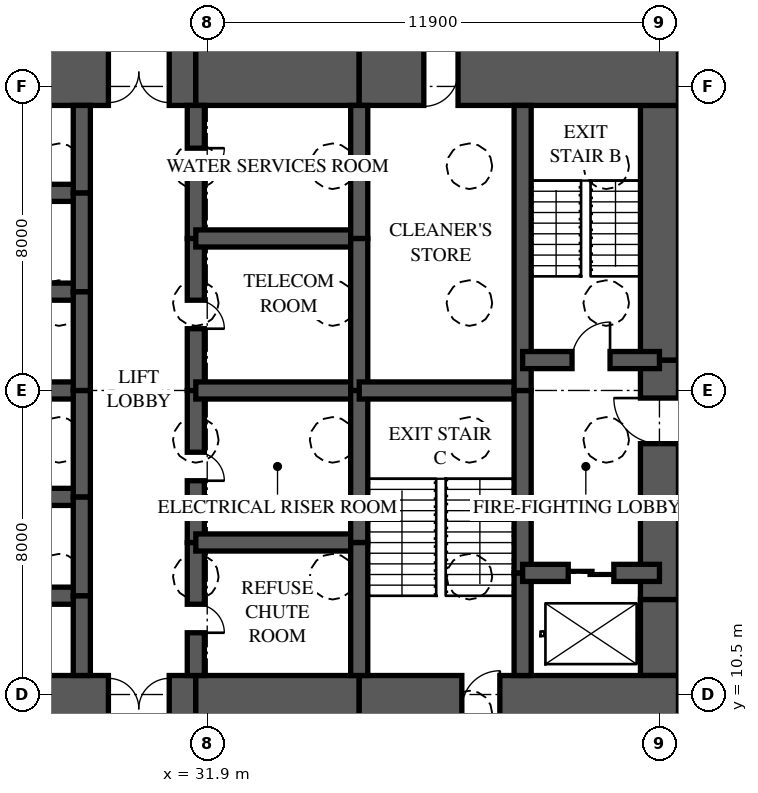
"""IFC4 building model, lengths in metres.
Left out: names, types, materials, properties, quantities, classifications, styles, units other than length and angle.
Written with IfcOpenShell. Run it as: python <this file> out.ifc"""

import sys

from ifc_helpers import new_model, si_unit, direction, frame, frame_2d, origin, place, context, subcontext, project, spatial, rectangle, extrude, element, fill, save


model = new_model("IFC4")
c1 = context("Model", 3, precision=1e-05, world=origin(), true_north=direction((0.0, 1.0)))
c2 = subcontext(c1, "Body", "Model", "MODEL_VIEW")
j1 = project(units=[si_unit("LENGTHUNIT", "METRE"), si_unit("PLANEANGLEUNIT", "RADIAN")], contexts=[c1])
p1 = place(None, origin())
s1 = spatial("IfcSite", under=j1, at=p1, CompositionType="ELEMENT")
p2 = place(p1, origin())
s2 = spatial("IfcBuilding", under=s1, at=p2, CompositionType="ELEMENT")
p3 = place(p2, frame((0.0, 0.0, -7.5)))
s3 = spatial("IfcBuildingStorey", under=s2, at=p3, CompositionType="ELEMENT", Elevation=-7.5)
p4 = place(p3, frame((26.0, 10.125, 0.0), z_axis=(0.0, 0.0, 1.0), x_axis=(1.0, 0.0, 0.0)))
e1 = element("IfcWall", 1, at=p4, inside=s3, PredefinedType="SHEAR", context=c2, shape_type="SweptSolid", body=[
    extrude(rectangle(XDim=5.6, YDim=1.75, at=frame_2d((2.8, 0.0))), origin(), (0.0, 0.0, 1.0), 3.5),
])
p5 = place(p4, frame((3.3, 0.0, 0.0)))
e2 = element("IfcOpeningElement", 2, at=p5, cuts=e1, PredefinedType="OPENING", context=c2, shape_type="SweptSolid", body=[
    extrude(rectangle(XDim=1.6, YDim=2.1, at=frame_2d((0.8, 1.05))), frame((0.0, 0.885, 0.0), z_axis=(0.0, -1.0, 0.0), x_axis=(1.0, 0.0, 0.0)), (0.0, 0.0, 1.0), 1.77),
])
p6 = place(p3, frame((31.6, 10.125, 0.0), z_axis=(0.0, 0.0, 1.0), x_axis=(1.0, 0.0, 0.0)))
e3 = element("IfcWall", 3, at=p6, inside=s3, PredefinedType="SHEAR", context=c2, shape_type="SweptSolid", body=[
    extrude(rectangle(XDim=4.3, YDim=1.75, at=frame_2d((2.15, 0.0))), origin(), (0.0, 0.0, 1.0), 3.5),
])
p7 = place(p3, frame((35.9, 10.125, 0.0), z_axis=(0.0, 0.0, 1.0), x_axis=(1.0, 0.0, 0.0)))
e4 = element("IfcWall", 4, at=p7, inside=s3, PredefinedType="SHEAR", context=c2, shape_type="SweptSolid", body=[
    extrude(rectangle(XDim=8.4, YDim=1.75, at=frame_2d((4.2, 0.0))), origin(), (0.0, 0.0, 1.0), 3.5),
])
p8 = place(p7, frame((2.7, 0.0, 0.0)))
e5 = element("IfcOpeningElement", 5, at=p8, cuts=e4, PredefinedType="OPENING", context=c2, shape_type="SweptSolid", body=[
    extrude(rectangle(XDim=1.0, YDim=2.1, at=frame_2d((0.5, 1.05))), frame((0.0, 0.885, 0.0), z_axis=(0.0, -1.0, 0.0), x_axis=(1.0, 0.0, 0.0)), (0.0, 0.0, 1.0), 1.77),
])
p9 = place(p3, frame((44.3, 26.875, 0.0), z_axis=(0.0, 0.0, 1.0), x_axis=(-1.0, 0.0, 0.0)))
e6 = element("IfcWall", 6, at=p9, inside=s3, PredefinedType="SHEAR", context=c2, shape_type="SweptSolid", body=[
    extrude(rectangle(XDim=8.4, YDim=1.75, at=frame_2d((4.2, 0.0))), origin(), (0.0, 0.0, 1.0), 3.5),
])
p10 = place(p9, frame((5.8, 0.0, 0.0)))
e7 = element("IfcOpeningElement", 7, at=p10, cuts=e6, PredefinedType="OPENING", context=c2, shape_type="SweptSolid", body=[
    extrude(rectangle(XDim=0.9, YDim=2.1, at=frame_2d((0.45, 1.05))), frame((0.0, 0.885, 0.0), z_axis=(0.0, -1.0, 0.0), x_axis=(1.0, 0.0, 0.0)), (0.0, 0.0, 1.0), 1.77),
])
p11 = place(p3, frame((35.9, 26.875, 0.0), z_axis=(0.0, 0.0, 1.0), x_axis=(-1.0, 0.0, 0.0)))
e8 = element("IfcWall", 8, at=p11, inside=s3, PredefinedType="SHEAR", context=c2, shape_type="SweptSolid", body=[
    extrude(rectangle(XDim=4.3, YDim=1.75, at=frame_2d((2.15, 0.0))), origin(), (0.0, 0.0, 1.0), 3.5),
])
p12 = place(p3, frame((31.6, 26.875, 0.0), z_axis=(0.0, 0.0, 1.0), x_axis=(-1.0, 0.0, 0.0)))
e9 = element("IfcWall", 9, at=p12, inside=s3, PredefinedType="SHEAR", context=c2, shape_type="SweptSolid", body=[
    extrude(rectangle(XDim=5.6, YDim=1.75, at=frame_2d((2.8, 0.0))), origin(), (0.0, 0.0, 1.0), 3.5),
])
p13 = place(p12, frame((0.7, 0.0, 0.0)))
e10 = element("IfcOpeningElement", 10, at=p13, cuts=e9, PredefinedType="OPENING", context=c2, shape_type="SweptSolid", body=[
    extrude(rectangle(XDim=1.6, YDim=2.1, at=frame_2d((0.8, 1.05))), frame((0.0, 0.885, 0.0), z_axis=(0.0, -1.0, 0.0), x_axis=(1.0, 0.0, 0.0)), (0.0, 0.0, 1.0), 1.77),
])
p14 = place(p3, frame((43.8, 11.0, 0.0), z_axis=(0.0, 0.0, 1.0), x_axis=(0.0, 1.0, 0.0)))
e11 = element("IfcWall", 11, at=p14, inside=s3, PredefinedType="SHEAR", context=c2, shape_type="SweptSolid", body=[
    extrude(rectangle(XDim=2.0, YDim=1.0, at=frame_2d((1.0, 0.0))), origin(), (0.0, 0.0, 1.0), 3.5),
])
p15 = place(p3, frame((43.8, 13.0, 0.0), z_axis=(0.0, 0.0, 1.0), x_axis=(0.0, 1.0, 0.0)))
e12 = element("IfcWall", 12, at=p15, inside=s3, PredefinedType="SHEAR", context=c2, shape_type="SweptSolid", body=[
    extrude(rectangle(XDim=6.3, YDim=1.0, at=frame_2d((3.15, 0.0))), origin(), (0.0, 0.0, 1.0), 3.5),
])
p16 = place(p15, frame((4.1, 0.0, 0.0)))
e13 = element("IfcOpeningElement", 13, at=p16, cuts=e12, PredefinedType="OPENING", context=c2, shape_type="SweptSolid", body=[
    extrude(rectangle(XDim=1.2, YDim=2.2, at=frame_2d((0.6, 1.1))), frame((0.0, 0.51, 0.0), z_axis=(0.0, -1.0, 0.0), x_axis=(1.0, 0.0, 0.0)), (0.0, 0.0, 1.0), 1.02),
])
p17 = place(p3, frame((43.8, 19.3, 0.0), z_axis=(0.0, 0.0, 1.0), x_axis=(0.0, 1.0, 0.0)))
e14 = element("IfcWall", 14, at=p17, inside=s3, PredefinedType="SHEAR", context=c2, shape_type="SweptSolid", body=[
    extrude(rectangle(XDim=6.7, YDim=1.0, at=frame_2d((3.35, 0.0))), origin(), (0.0, 0.0, 1.0), 3.5),
])
p18 = place(p3, frame((28.6, 11.0, 0.0), z_axis=(0.0, 0.0, 1.0), x_axis=(0.0, 1.0, 0.0)))
e15 = element("IfcWall", 15, at=p18, inside=s3, PredefinedType="SHEAR", context=c2, shape_type="SweptSolid", body=[
    extrude(rectangle(XDim=2.1, YDim=0.45, at=frame_2d((1.05, 0.0))), origin(), (0.0, 0.0, 1.0), 3.5),
])
p19 = place(p3, frame((28.6, 13.1, 0.0), z_axis=(0.0, 0.0, 1.0), x_axis=(0.0, 1.0, 0.0)))
e16 = element("IfcWall", 16, at=p19, inside=s3, PredefinedType="SHEAR", context=c2, shape_type="SweptSolid", body=[
    extrude(rectangle(XDim=2.6, YDim=0.45, at=frame_2d((1.3, 0.0))), origin(), (0.0, 0.0, 1.0), 3.5),
])
p20 = place(p3, frame((28.6, 15.7, 0.0), z_axis=(0.0, 0.0, 1.0), x_axis=(0.0, 1.0, 0.0)))
e17 = element("IfcWall", 17, at=p20, inside=s3, PredefinedType="SHEAR", context=c2, shape_type="SweptSolid", body=[
    extrude(rectangle(XDim=2.8, YDim=0.45, at=frame_2d((1.4, 0.0))), origin(), (0.0, 0.0, 1.0), 3.5),
])
p21 = place(p3, frame((28.6, 18.5, 0.0), z_axis=(0.0, 0.0, 1.0), x_axis=(0.0, 1.0, 0.0)))
e18 = element("IfcWall", 18, at=p21, inside=s3, PredefinedType="SHEAR", context=c2, shape_type="SweptSolid", body=[
    extrude(rectangle(XDim=2.6, YDim=0.45, at=frame_2d((1.3, 0.0))), origin(), (0.0, 0.0, 1.0), 3.5),
])
p22 = place(p3, frame((28.6, 21.1, 0.0), z_axis=(0.0, 0.0, 1.0), x_axis=(0.0, 1.0, 0.0)))
e19 = element("IfcWall", 19, at=p22, inside=s3, PredefinedType="SHEAR", context=c2, shape_type="SweptSolid", body=[
    extrude(rectangle(XDim=2.6, YDim=0.45, at=frame_2d((1.3, 0.0))), origin(), (0.0, 0.0, 1.0), 3.5),
])
p23 = place(p3, frame((28.6, 23.7, 0.0), z_axis=(0.0, 0.0, 1.0), x_axis=(0.0, 1.0, 0.0)))
e20 = element("IfcWall", 20, at=p23, inside=s3, PredefinedType="SHEAR", context=c2, shape_type="SweptSolid", body=[
    extrude(rectangle(XDim=2.3, YDim=0.45, at=frame_2d((1.15, 0.0))), origin(), (0.0, 0.0, 1.0), 3.5),
])
p24 = place(p3, frame((31.6, 11.0, 0.0), z_axis=(0.0, 0.0, 1.0), x_axis=(0.0, 1.0, 0.0)))
e21 = element("IfcWall", 21, at=p24, inside=s3, PredefinedType="SHEAR", context=c2, shape_type="SweptSolid", body=[
    extrude(rectangle(XDim=3.5, YDim=0.45, at=frame_2d((1.75, 0.0))), origin(), (0.0, 0.0, 1.0), 3.5),
])
p25 = place(p24, frame((1.125, 0.0, 0.0)))
e22 = element("IfcOpeningElement", 22, at=p25, cuts=e21, PredefinedType="OPENING", context=c2, shape_type="SweptSolid", body=[
    extrude(rectangle(XDim=0.75, YDim=2.1, at=frame_2d((0.375, 1.05))), frame((0.0, 0.235, 0.0), z_axis=(0.0, -1.0, 0.0), x_axis=(1.0, 0.0, 0.0)), (0.0, 0.0, 1.0), 0.47),
])
p26 = place(p3, frame((31.6, 14.5, 0.0), z_axis=(0.0, 0.0, 1.0), x_axis=(0.0, 1.0, 0.0)))
e23 = element("IfcWall", 23, at=p26, inside=s3, PredefinedType="SHEAR", context=c2, shape_type="SweptSolid", body=[
    extrude(rectangle(XDim=4.0, YDim=0.45, at=frame_2d((2.0, 0.0))), origin(), (0.0, 0.0, 1.0), 3.5),
])
p27 = place(p26, frame((1.625, 0.0, 0.0)))
e24 = element("IfcOpeningElement", 24, at=p27, cuts=e23, PredefinedType="OPENING", context=c2, shape_type="SweptSolid", body=[
    extrude(rectangle(XDim=0.75, YDim=2.1, at=frame_2d((0.375, 1.05))), frame((0.0, 0.235, 0.0), z_axis=(0.0, -1.0, 0.0), x_axis=(1.0, 0.0, 0.0)), (0.0, 0.0, 1.0), 0.47),
])
p28 = place(p3, frame((31.6, 18.5, 0.0), z_axis=(0.0, 0.0, 1.0), x_axis=(0.0, 1.0, 0.0)))
e25 = element("IfcWall", 25, at=p28, inside=s3, PredefinedType="SHEAR", context=c2, shape_type="SweptSolid", body=[
    extrude(rectangle(XDim=4.0, YDim=0.45, at=frame_2d((2.0, 0.0))), origin(), (0.0, 0.0, 1.0), 3.5),
])
p29 = place(p28, frame((1.625, 0.0, 0.0)))
e26 = element("IfcOpeningElement", 26, at=p29, cuts=e25, PredefinedType="OPENING", context=c2, shape_type="SweptSolid", body=[
    extrude(rectangle(XDim=0.75, YDim=2.1, at=frame_2d((0.375, 1.05))), frame((0.0, 0.235, 0.0), z_axis=(0.0, -1.0, 0.0), x_axis=(1.0, 0.0, 0.0)), (0.0, 0.0, 1.0), 0.47),
])
p30 = place(p3, frame((31.6, 22.5, 0.0), z_axis=(0.0, 0.0, 1.0), x_axis=(0.0, 1.0, 0.0)))
e27 = element("IfcWall", 27, at=p30, inside=s3, PredefinedType="SHEAR", context=c2, shape_type="SweptSolid", body=[
    extrude(rectangle(XDim=3.5, YDim=0.45, at=frame_2d((1.75, 0.0))), origin(), (0.0, 0.0, 1.0), 3.5),
])
p31 = place(p30, frame((1.625, 0.0, 0.0)))
e28 = element("IfcOpeningElement", 28, at=p31, cuts=e27, PredefinedType="OPENING", context=c2, shape_type="SweptSolid", body=[
    extrude(rectangle(XDim=0.75, YDim=2.1, at=frame_2d((0.375, 1.05))), frame((0.0, 0.235, 0.0), z_axis=(0.0, -1.0, 0.0), x_axis=(1.0, 0.0, 0.0)), (0.0, 0.0, 1.0), 0.47),
])
p32 = place(p3, frame((35.9, 11.0, 0.0), z_axis=(0.0, 0.0, 1.0), x_axis=(0.0, 1.0, 0.0)))
e29 = element("IfcWall", 29, at=p32, inside=s3, PredefinedType="SHEAR", context=c2, shape_type="SweptSolid", body=[
    extrude(rectangle(XDim=3.5, YDim=0.45, at=frame_2d((1.75, 0.0))), origin(), (0.0, 0.0, 1.0), 3.5),
])
for number, where, z_axis, x_axis in (
    (30, (35.9, 14.5, 0.0), (0.0, 0.0, 1.0), (0.0, 1.0, 0.0)),
    (31, (35.9, 18.5, 0.0), (0.0, 0.0, 1.0), (0.0, 1.0, 0.0)),
):
    element("IfcWall", number, at=place(p3, frame(where, z_axis=z_axis, x_axis=x_axis)), inside=s3, PredefinedType="SHEAR", context=c2, shape_type="SweptSolid", body=[
        extrude(rectangle(XDim=4.0, YDim=0.45, at=frame_2d((2.0, 0.0))), origin(), (0.0, 0.0, 1.0), 3.5),
    ])
p33 = place(p3, frame((35.9, 22.5, 0.0), z_axis=(0.0, 0.0, 1.0), x_axis=(0.0, 1.0, 0.0)))
e32 = element("IfcWall", 32, at=p33, inside=s3, PredefinedType="SHEAR", context=c2, shape_type="SweptSolid", body=[
    extrude(rectangle(XDim=3.5, YDim=0.45, at=frame_2d((1.75, 0.0))), origin(), (0.0, 0.0, 1.0), 3.5),
])
p34 = place(p3, frame((40.2, 11.0, 0.0), z_axis=(0.0, 0.0, 1.0), x_axis=(0.0, 1.0, 0.0)))
e33 = element("IfcWall", 33, at=p34, inside=s3, PredefinedType="SHEAR", context=c2, shape_type="SweptSolid", body=[
    extrude(rectangle(XDim=2.7, YDim=0.45, at=frame_2d((1.35, 0.0))), origin(), (0.0, 0.0, 1.0), 3.5),
])
p35 = place(p3, frame((40.2, 13.7, 0.0), z_axis=(0.0, 0.0, 1.0), x_axis=(0.0, 1.0, 0.0)))
e34 = element("IfcWall", 34, at=p35, inside=s3, PredefinedType="SHEAR", context=c2, shape_type="SweptSolid", body=[
    extrude(rectangle(XDim=4.8, YDim=0.45, at=frame_2d((2.4, 0.0))), origin(), (0.0, 0.0, 1.0), 3.5),
])
p36 = place(p3, frame((40.2, 18.5, 0.0), z_axis=(0.0, 0.0, 1.0), x_axis=(0.0, 1.0, 0.0)))
e35 = element("IfcWall", 35, at=p36, inside=s3, PredefinedType="SHEAR", context=c2, shape_type="SweptSolid", body=[
    extrude(rectangle(XDim=7.5, YDim=0.45, at=frame_2d((3.75, 0.0))), origin(), (0.0, 0.0, 1.0), 3.5),
])
for number, where, z_axis, x_axis in (
    (36, (26.0, 13.1, 0.0), (0.0, 0.0, 1.0), (1.0, 0.0, 0.0)),
    (37, (26.0, 15.7, 0.0), (0.0, 0.0, 1.0), (1.0, 0.0, 0.0)),
    (38, (26.0, 18.5, 0.0), (0.0, 0.0, 1.0), (1.0, 0.0, 0.0)),
    (39, (26.0, 21.1, 0.0), (0.0, 0.0, 1.0), (1.0, 0.0, 0.0)),
    (40, (26.0, 23.7, 0.0), (0.0, 0.0, 1.0), (1.0, 0.0, 0.0)),
):
    element("IfcWall", number, at=place(p3, frame(where, z_axis=z_axis, x_axis=x_axis)), inside=s3, PredefinedType="SHEAR", context=c2, shape_type="SweptSolid", body=[
        extrude(rectangle(XDim=2.6, YDim=0.45, at=frame_2d((1.3, 0.0))), origin(), (0.0, 0.0, 1.0), 3.5),
    ])
for number, where, z_axis, x_axis in (
    (41, (31.6, 14.5, 0.0), (0.0, 0.0, 1.0), (1.0, 0.0, 0.0)),
    (42, (31.6, 18.5, 0.0), (0.0, 0.0, 1.0), (1.0, 0.0, 0.0)),
    (43, (31.6, 22.5, 0.0), (0.0, 0.0, 1.0), (1.0, 0.0, 0.0)),
):
    element("IfcWall", number, at=place(p3, frame(where, z_axis=z_axis, x_axis=x_axis)), inside=s3, PredefinedType="SHEAR", context=c2, shape_type="SweptSolid", body=[
        extrude(rectangle(XDim=4.3, YDim=0.45, at=frame_2d((2.15, 0.0))), origin(), (0.0, 0.0, 1.0), 3.5),
    ])
p37 = place(p3, frame((35.9, 18.5, 0.0), z_axis=(0.0, 0.0, 1.0), x_axis=(1.0, 0.0, 0.0)))
e44 = element("IfcWall", 44, at=p37, inside=s3, PredefinedType="SHEAR", context=c2, shape_type="SweptSolid", body=[
    extrude(rectangle(XDim=4.3, YDim=0.45, at=frame_2d((2.15, 0.0))), origin(), (0.0, 0.0, 1.0), 3.5),
])
p38 = place(p3, frame((40.2, 13.7, 0.0), z_axis=(0.0, 0.0, 1.0), x_axis=(1.0, 0.0, 0.0)))
e45 = element("IfcWall", 45, at=p38, inside=s3, PredefinedType="SHEAR", context=c2, shape_type="SweptSolid", body=[
    extrude(rectangle(XDim=3.6, YDim=0.45, at=frame_2d((1.8, 0.0))), origin(), (0.0, 0.0, 1.0), 3.5),
])
p39 = place(p38, frame((1.2, 0.0, 0.0)))
e46 = element("IfcOpeningElement", 46, at=p39, cuts=e45, PredefinedType="OPENING", context=c2, shape_type="SweptSolid", body=[
    extrude(rectangle(XDim=1.2, YDim=2.1, at=frame_2d((0.6, 1.05))), frame((0.0, 0.235, 0.0), z_axis=(0.0, -1.0, 0.0), x_axis=(1.0, 0.0, 0.0)), (0.0, 0.0, 1.0), 0.47),
])
p40 = place(p3, frame((40.2, 19.3, 0.0), z_axis=(0.0, 0.0, 1.0), x_axis=(1.0, 0.0, 0.0)))
e47 = element("IfcWall", 47, at=p40, inside=s3, PredefinedType="SHEAR", context=c2, shape_type="SweptSolid", body=[
    extrude(rectangle(XDim=3.6, YDim=0.45, at=frame_2d((1.8, 0.0))), origin(), (0.0, 0.0, 1.0), 3.5),
])
p41 = place(p40, frame((1.3, 0.0, 0.0)))
e48 = element("IfcOpeningElement", 48, at=p41, cuts=e47, PredefinedType="OPENING", context=c2, shape_type="SweptSolid", body=[
    extrude(rectangle(XDim=1.0, YDim=2.1, at=frame_2d((0.5, 1.05))), frame((0.0, 0.235, 0.0), z_axis=(0.0, -1.0, 0.0), x_axis=(1.0, 0.0, 0.0)), (0.0, 0.0, 1.0), 0.47),
])
p42 = place(p41, origin())
e49 = element("IfcDoor", 49, at=p42, inside=s3, OperationType="SINGLE_SWING_RIGHT", PredefinedType="DOOR", context=c2, shape_type="SweptSolid", body=[
    extrude(rectangle(XDim=1.0, YDim=2.1, at=frame_2d((0.5, 1.05))), frame((0.0, 0.025, 0.0), z_axis=(0.0, -1.0, 0.0), x_axis=(1.0, 0.0, 0.0)), (0.0, 0.0, 1.0), 0.05),
])
fill(e48, e49)
p43 = place(p16, origin())
e50 = element("IfcDoor", 50, at=p43, inside=s3, OperationType="SINGLE_SWING_RIGHT", PredefinedType="DOOR", context=c2, shape_type="SweptSolid", body=[
    extrude(rectangle(XDim=1.2, YDim=2.2, at=frame_2d((0.6, 1.1))), frame((0.0, 0.025, 0.0), z_axis=(0.0, -1.0, 0.0), x_axis=(1.0, 0.0, 0.0)), (0.0, 0.0, 1.0), 0.05),
])
fill(e13, e50)
p44 = place(p39, origin())
e51 = element("IfcDoor", 51, at=p44, inside=s3, OperationType="SLIDING_TO_LEFT", PredefinedType="DOOR", context=c2, shape_type="SweptSolid", body=[
    extrude(rectangle(XDim=1.2, YDim=2.1, at=frame_2d((0.6, 1.05))), frame((0.0, 0.025, 0.0), z_axis=(0.0, -1.0, 0.0), x_axis=(1.0, 0.0, 0.0)), (0.0, 0.0, 1.0), 0.05),
])
fill(e46, e51)
p45 = place(p5, origin())
e52 = element("IfcDoor", 52, at=p45, inside=s3, OperationType="DOUBLE_DOOR_SINGLE_SWING", PredefinedType="DOOR", context=c2, shape_type="SweptSolid", body=[
    extrude(rectangle(XDim=1.6, YDim=2.1, at=frame_2d((0.8, 1.05))), frame((0.0, 0.025, 0.0), z_axis=(0.0, -1.0, 0.0), x_axis=(1.0, 0.0, 0.0)), (0.0, 0.0, 1.0), 0.05),
])
fill(e2, e52)
p46 = place(p13, origin())
e53 = element("IfcDoor", 53, at=p46, inside=s3, OperationType="DOUBLE_DOOR_SINGLE_SWING", PredefinedType="DOOR", context=c2, shape_type="SweptSolid", body=[
    extrude(rectangle(XDim=1.6, YDim=2.1, at=frame_2d((0.8, 1.05))), frame((0.0, 0.025, 0.0), z_axis=(0.0, -1.0, 0.0), x_axis=(1.0, 0.0, 0.0)), (0.0, 0.0, 1.0), 0.05),
])
fill(e10, e53)
p47 = place(p25, frame((0.75, 0.0, 0.0), z_axis=(0.0, 0.0, 1.0), x_axis=(-1.0, 0.0, 0.0)))
e54 = element("IfcDoor", 54, at=p47, inside=s3, OperationType="SINGLE_SWING_RIGHT", PredefinedType="DOOR", context=c2, shape_type="SweptSolid", body=[
    extrude(rectangle(XDim=0.75, YDim=2.1, at=frame_2d((0.375, 1.05))), frame((0.0, 0.025, 0.0), z_axis=(0.0, -1.0, 0.0), x_axis=(1.0, 0.0, 0.0)), (0.0, 0.0, 1.0), 0.05),
])
fill(e22, e54)
p48 = place(p27, frame((0.75, 0.0, 0.0), z_axis=(0.0, 0.0, 1.0), x_axis=(-1.0, 0.0, 0.0)))
e55 = element("IfcDoor", 55, at=p48, inside=s3, OperationType="SINGLE_SWING_RIGHT", PredefinedType="DOOR", context=c2, shape_type="SweptSolid", body=[
    extrude(rectangle(XDim=0.75, YDim=2.1, at=frame_2d((0.375, 1.05))), frame((0.0, 0.025, 0.0), z_axis=(0.0, -1.0, 0.0), x_axis=(1.0, 0.0, 0.0)), (0.0, 0.0, 1.0), 0.05),
])
fill(e24, e55)
p49 = place(p29, frame((0.75, 0.0, 0.0), z_axis=(0.0, 0.0, 1.0), x_axis=(-1.0, 0.0, 0.0)))
e56 = element("IfcDoor", 56, at=p49, inside=s3, OperationType="SINGLE_SWING_RIGHT", PredefinedType="DOOR", context=c2, shape_type="SweptSolid", body=[
    extrude(rectangle(XDim=0.75, YDim=2.1, at=frame_2d((0.375, 1.05))), frame((0.0, 0.025, 0.0), z_axis=(0.0, -1.0, 0.0), x_axis=(1.0, 0.0, 0.0)), (0.0, 0.0, 1.0), 0.05),
])
fill(e26, e56)
p50 = place(p31, frame((0.75, 0.0, 0.0), z_axis=(0.0, 0.0, 1.0), x_axis=(-1.0, 0.0, 0.0)))
e57 = element("IfcDoor", 57, at=p50, inside=s3, OperationType="SINGLE_SWING_LEFT", PredefinedType="DOOR", context=c2, shape_type="SweptSolid", body=[
    extrude(rectangle(XDim=0.75, YDim=2.1, at=frame_2d((0.375, 1.05))), frame((0.0, 0.025, 0.0), z_axis=(0.0, -1.0, 0.0), x_axis=(1.0, 0.0, 0.0)), (0.0, 0.0, 1.0), 0.05),
])
fill(e28, e57)
p51 = place(p8, origin())
e58 = element("IfcDoor", 58, at=p51, inside=s3, OperationType="SINGLE_SWING_RIGHT", PredefinedType="DOOR", context=c2, shape_type="SweptSolid", body=[
    extrude(rectangle(XDim=1.0, YDim=2.1, at=frame_2d((0.5, 1.05))), frame((0.0, 0.025, 0.0), z_axis=(0.0, -1.0, 0.0), x_axis=(1.0, 0.0, 0.0)), (0.0, 0.0, 1.0), 0.05),
])
fill(e5, e58)
p52 = place(p10, origin())
e59 = element("IfcDoor", 59, at=p52, inside=s3, OperationType="SINGLE_SWING_RIGHT", PredefinedType="DOOR", context=c2, shape_type="SweptSolid", body=[
    extrude(rectangle(XDim=0.9, YDim=2.1, at=frame_2d((0.45, 1.05))), frame((0.0, 0.47, 0.0), z_axis=(0.0, -1.0, 0.0), x_axis=(1.0, 0.0, 0.0)), (0.0, 0.0, 1.0), 0.8),
])
fill(e7, e59)
save(model, sys.argv[1])
